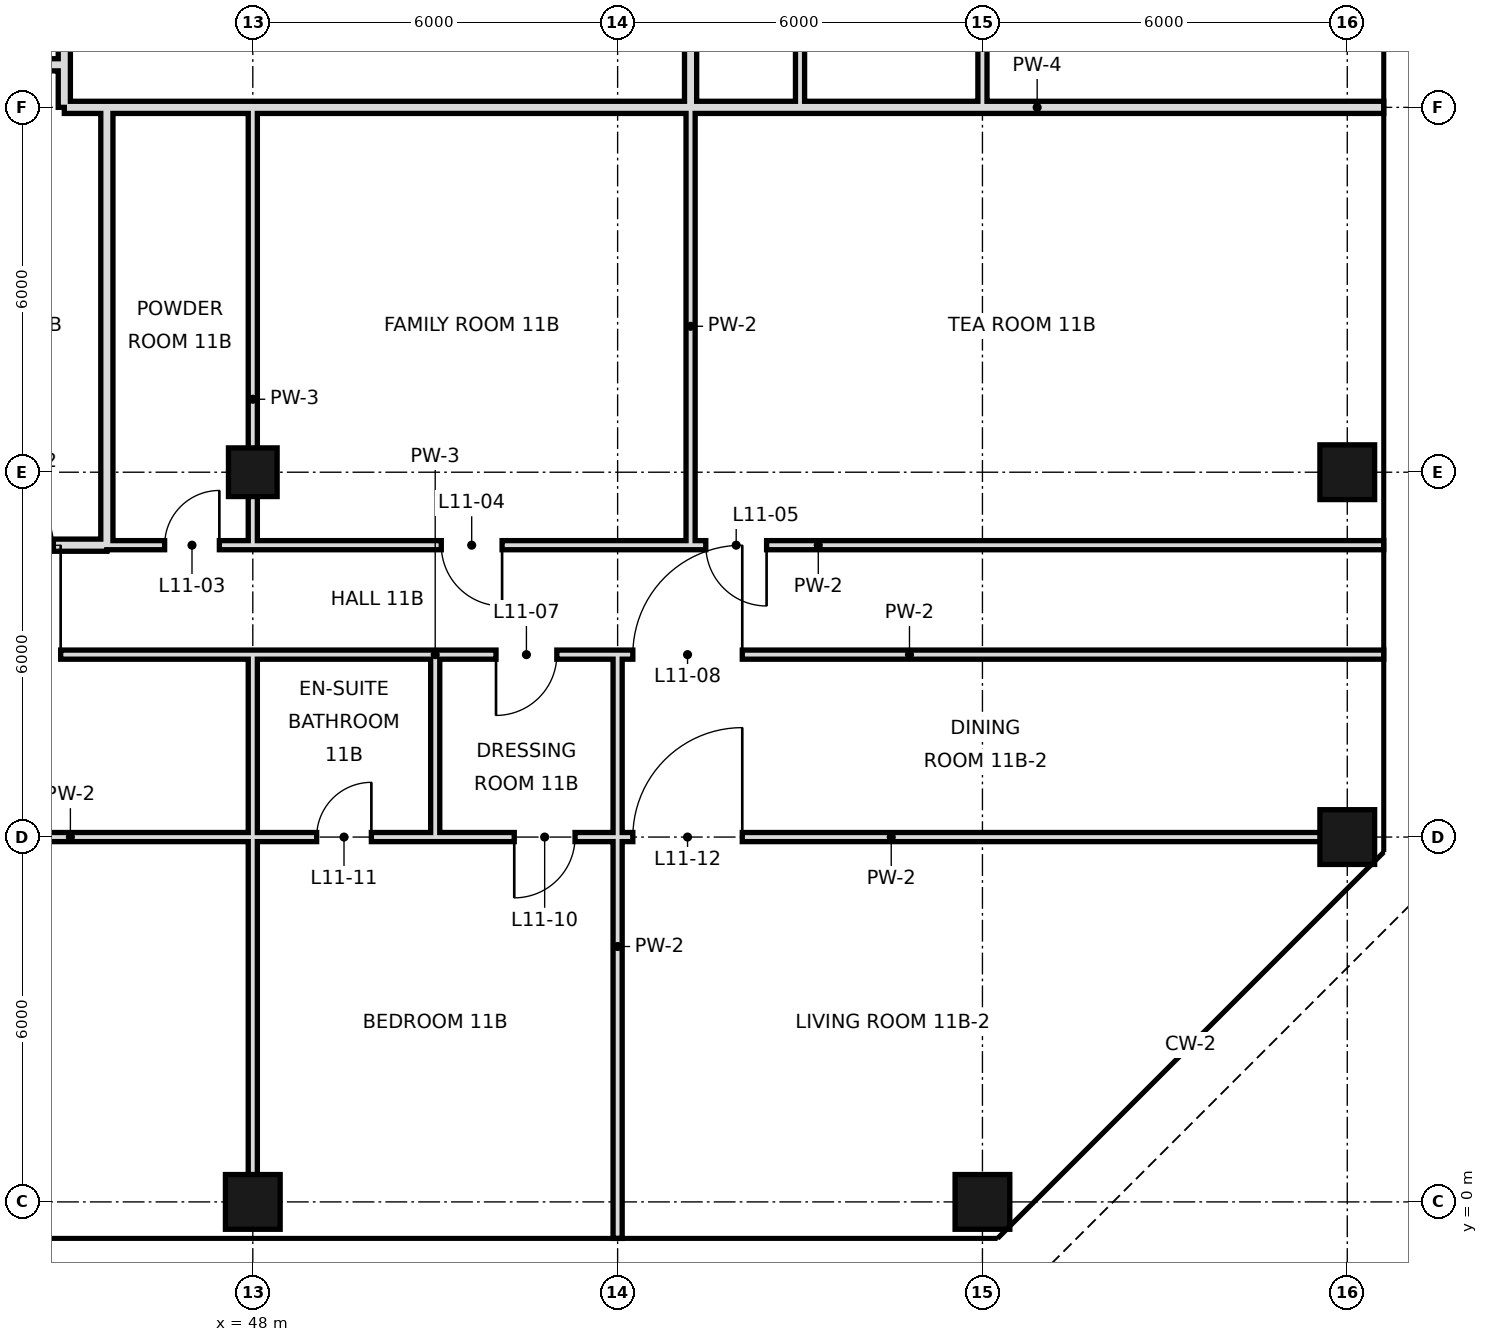
"""IFC4 building model, lengths in metres.
Left out: names, types, materials, properties, quantities, classifications, styles, units other than length and angle.
Written with IfcOpenShell. Run it as: python <this file> out.ifc"""

import sys

from ifc_helpers import new_model, si_unit, direction, frame, frame_2d, origin, origin_2d, place, context, subcontext, project, spatial, rectangle, hollow_rectangle, extrude, element, fill, save


model = new_model("IFC4")
c1 = context("Model", 3, precision=1e-05, world=origin(), true_north=direction((0.0, 1.0)))
c2 = subcontext(c1, "Body", "Model", "MODEL_VIEW")
j1 = project(units=[si_unit("LENGTHUNIT", "METRE"), si_unit("PLANEANGLEUNIT", "RADIAN")], contexts=[c1])
p1 = place(None, origin())
s1 = spatial("IfcSite", under=j1, at=p1, CompositionType="ELEMENT")
p2 = place(p1, origin())
s2 = spatial("IfcBuilding", under=s1, at=p2, CompositionType="ELEMENT")
p3 = place(p2, frame((0.0, 0.0, 60.6)))
s3 = spatial("IfcBuildingStorey", under=s2, at=p3, CompositionType="ELEMENT", Elevation=60.6)
p4 = place(p3, frame((48.0, 0.0, 0.0), z_axis=(0.0, 0.0, 1.0), x_axis=(1.0, 0.0, 0.0)))
e1 = element("IfcColumn", 1, at=p4, inside=s3, PredefinedType="COLUMN", context=c2, shape_type="SweptSolid", body=[
    extrude(hollow_rectangle(XDim=0.9, YDim=0.9, WallThickness=0.045, at=origin_2d()), origin(), (0.0, 0.0, 1.0), 3.6),
])
p5 = place(p3, frame((48.0, 12.0, 0.0), z_axis=(0.0, 0.0, 1.0), x_axis=(1.0, 0.0, 0.0)))
e2 = element("IfcColumn", 2, at=p5, inside=s3, PredefinedType="COLUMN", context=c2, shape_type="SweptSolid", body=[
    extrude(hollow_rectangle(XDim=0.8, YDim=0.8, WallThickness=0.04, at=origin_2d()), origin(), (0.0, 0.0, 1.0), 3.6),
])
for number, where, z_axis, x_axis in (
    (3, (60.0, 0.0, 0.0), (0.0, 0.0, 1.0), (1.0, 0.0, 0.0)),
    (4, (66.0, 6.0, 0.0), (0.0, 0.0, 1.0), (1.0, 0.0, 0.0)),
    (5, (66.0, 12.0, 0.0), (0.0, 0.0, 1.0), (1.0, 0.0, 0.0)),
):
    element("IfcColumn", number, at=place(p3, frame(where, z_axis=z_axis, x_axis=x_axis)), inside=s3, PredefinedType="COLUMN", context=c2, shape_type="SweptSolid", body=[
        extrude(hollow_rectangle(XDim=0.9, YDim=0.9, WallThickness=0.045, at=origin_2d()), origin(), (0.0, 0.0, 1.0), 3.6),
    ])
p6 = place(p3, frame((44.9, 18.0, 0.0), z_axis=(0.0, 0.0, 1.0), x_axis=(0.0, 1.0, 0.0)))
e6 = element("IfcWall", 6, at=p6, inside=s3, PredefinedType="SOLIDWALL", context=c2, shape_type="SweptSolid", body=[
    extrude(rectangle(XDim=4.2, YDim=0.2, at=frame_2d((2.1, 0.0))), origin(), (0.0, 0.0, 1.0), 2.97),
])
p7 = place(p3, frame((45.6, 10.8, 0.0), z_axis=(0.0, 0.0, 1.0), x_axis=(0.0, 1.0, 0.0)))
e7 = element("IfcWall", 7, at=p7, inside=s3, PredefinedType="SOLIDWALL", context=c2, shape_type="SweptSolid", body=[
    extrude(rectangle(XDim=7.2, YDim=0.2, at=frame_2d((3.6, 0.0))), origin(), (0.0, 0.0, 1.0), 2.72),
])
p8 = place(p3, frame((48.0, 0.0, 0.0), z_axis=(0.0, 0.0, 1.0), x_axis=(0.0, 1.0, 0.0)))
e8 = element("IfcWall", 8, at=p8, inside=s3, PredefinedType="PARTITIONING", context=c2, shape_type="SweptSolid", body=[
    extrude(rectangle(XDim=6.0, YDim=0.15, at=frame_2d((3.0, 0.0))), origin(), (0.0, 0.0, 1.0), 2.72),
])
p9 = place(p3, frame((48.0, 6.0, 0.0), z_axis=(0.0, 0.0, 1.0), x_axis=(0.0, 1.0, 0.0)))
e9 = element("IfcWall", 9, at=p9, inside=s3, PredefinedType="PARTITIONING", context=c2, shape_type="SweptSolid", body=[
    extrude(rectangle(XDim=3.0, YDim=0.15, at=frame_2d((1.5, 0.0))), origin(), (0.0, 0.0, 1.0), 2.72),
])
p10 = place(p3, frame((48.0, 10.8, 0.0), z_axis=(0.0, 0.0, 1.0), x_axis=(0.0, 1.0, 0.0)))
e10 = element("IfcWall", 10, at=p10, inside=s3, PredefinedType="PARTITIONING", context=c2, shape_type="SweptSolid", body=[
    extrude(rectangle(XDim=7.2, YDim=0.15, at=frame_2d((3.6, 0.0))), origin(), (0.0, 0.0, 1.0), 2.72),
])
p11 = place(p3, frame((51.0, 6.0, 0.0), z_axis=(0.0, 0.0, 1.0), x_axis=(0.0, 1.0, 0.0)))
e11 = element("IfcWall", 11, at=p11, inside=s3, PredefinedType="PARTITIONING", context=c2, shape_type="SweptSolid", body=[
    extrude(rectangle(XDim=3.0, YDim=0.15, at=frame_2d((1.5, 0.0))), origin(), (0.0, 0.0, 1.0), 3.42),
])
p12 = place(p3, frame((54.0, -0.6, 0.0), z_axis=(0.0, 0.0, 1.0), x_axis=(0.0, 1.0, 0.0)))
e12 = element("IfcWall", 12, at=p12, inside=s3, PredefinedType="PARTITIONING", context=c2, shape_type="SweptSolid", body=[
    extrude(rectangle(XDim=9.6, YDim=0.15, at=frame_2d((4.8, 0.0))), origin(), (0.0, 0.0, 1.0), 3.42),
])
p13 = place(p3, frame((55.2, 18.0, 0.0), z_axis=(0.0, 0.0, 1.0), x_axis=(0.0, 1.0, 0.0)))
e13 = element("IfcWall", 13, at=p13, inside=s3, PredefinedType="SOLIDWALL", context=c2, shape_type="SweptSolid", body=[
    extrude(rectangle(XDim=4.2, YDim=0.2, at=frame_2d((2.1, 0.0))), origin(), (0.0, 0.0, 1.0), 2.52),
])
p14 = place(p13, frame((1.06, 0.0, 0.0)))
e14 = element("IfcOpeningElement", 14, at=p14, cuts=e13, PredefinedType="OPENING", context=c2, shape_type="SweptSolid", body=[
    extrude(rectangle(XDim=1.0, YDim=2.4, at=frame_2d((0.5, 1.2))), frame((0.0, 0.11, 0.0), z_axis=(0.0, -1.0, 0.0), x_axis=(1.0, 0.0, 0.0)), (0.0, 0.0, 1.0), 0.22),
])
p15 = place(p3, frame((55.2, 10.8, 0.0), z_axis=(0.0, 0.0, 1.0), x_axis=(0.0, 1.0, 0.0)))
e15 = element("IfcWall", 15, at=p15, inside=s3, PredefinedType="PARTITIONING", context=c2, shape_type="SweptSolid", body=[
    extrude(rectangle(XDim=7.2, YDim=0.15, at=frame_2d((3.6, 0.0))), origin(), (0.0, 0.0, 1.0), 3.42),
])
p16 = place(p3, frame((57.0, 18.0, 0.0), z_axis=(0.0, 0.0, 1.0), x_axis=(0.0, 1.0, 0.0)))
e16 = element("IfcWall", 16, at=p16, inside=s3, PredefinedType="PARTITIONING", context=c2, shape_type="SweptSolid", body=[
    extrude(rectangle(XDim=14.4, YDim=0.15, at=frame_2d((7.2, 0.0))), origin(), (0.0, 0.0, 1.0), 3.42),
])
p17 = place(p16, frame((7.6, 0.0, 0.0)))
e17 = element("IfcOpeningElement", 17, at=p17, cuts=e16, PredefinedType="OPENING", context=c2, shape_type="SweptSolid", body=[
    extrude(rectangle(XDim=1.0, YDim=2.4, at=frame_2d((0.5, 1.2))), frame((0.0, 0.085, 0.0), z_axis=(0.0, -1.0, 0.0), x_axis=(1.0, 0.0, 0.0)), (0.0, 0.0, 1.0), 0.17),
])
p18 = place(p16, frame((12.52, 0.0, 0.0)))
e18 = element("IfcOpeningElement", 18, at=p18, cuts=e16, PredefinedType="OPENING", context=c2, shape_type="SweptSolid", body=[
    extrude(rectangle(XDim=1.0, YDim=2.4, at=frame_2d((0.5, 1.2))), frame((0.0, 0.085, 0.0), z_axis=(0.0, -1.0, 0.0), x_axis=(1.0, 0.0, 0.0)), (0.0, 0.0, 1.0), 0.17),
])
p19 = place(p3, frame((60.0, 18.0, 0.0), z_axis=(0.0, 0.0, 1.0), x_axis=(0.0, 1.0, 0.0)))
e19 = element("IfcWall", 19, at=p19, inside=s3, PredefinedType="PARTITIONING", context=c2, shape_type="SweptSolid", body=[
    extrude(rectangle(XDim=14.4, YDim=0.15, at=frame_2d((7.2, 0.0))), origin(), (0.0, 0.0, 1.0), 3.42),
])
p20 = place(p19, frame((5.5, 0.0, 0.0)))
e20 = element("IfcOpeningElement", 20, at=p20, cuts=e19, PredefinedType="OPENING", context=c2, shape_type="SweptSolid", body=[
    extrude(rectangle(XDim=1.0, YDim=2.4, at=frame_2d((0.5, 1.2))), frame((0.0, 0.085, 0.0), z_axis=(0.0, -1.0, 0.0), x_axis=(1.0, 0.0, 0.0)), (0.0, 0.0, 1.0), 0.17),
])
p21 = place(p19, frame((12.52, 0.0, 0.0)))
e21 = element("IfcOpeningElement", 21, at=p21, cuts=e19, PredefinedType="OPENING", context=c2, shape_type="SweptSolid", body=[
    extrude(rectangle(XDim=1.0, YDim=2.4, at=frame_2d((0.5, 1.2))), frame((0.0, 0.085, 0.0), z_axis=(0.0, -1.0, 0.0), x_axis=(1.0, 0.0, 0.0)), (0.0, 0.0, 1.0), 0.17),
])
p22 = place(p3, frame((42.0, 10.8, 0.0), z_axis=(0.0, 0.0, 1.0), x_axis=(1.0, 0.0, 0.0)))
e22 = element("IfcWall", 22, at=p22, inside=s3, PredefinedType="SOLIDWALL", context=c2, shape_type="SweptSolid", body=[
    extrude(rectangle(XDim=3.6, YDim=0.2, at=frame_2d((1.8, 0.0))), origin(), (0.0, 0.0, 1.0), 2.72),
])
p23 = place(p22, frame((1.72, 0.0, 0.0)))
e23 = element("IfcOpeningElement", 23, at=p23, cuts=e22, PredefinedType="OPENING", context=c2, shape_type="SweptSolid", body=[
    extrude(rectangle(XDim=1.0, YDim=2.4, at=frame_2d((0.5, 1.2))), frame((0.0, 0.11, 0.0), z_axis=(0.0, -1.0, 0.0), x_axis=(1.0, 0.0, 0.0)), (0.0, 0.0, 1.0), 0.22),
])
p24 = place(p3, frame((48.0, 10.8, 0.0), z_axis=(0.0, 0.0, 1.0), x_axis=(1.0, 0.0, 0.0)))
e24 = element("IfcWall", 24, at=p24, inside=s3, PredefinedType="PARTITIONING", context=c2, shape_type="SweptSolid", body=[
    extrude(rectangle(XDim=18.6, YDim=0.15, at=frame_2d((9.3, 0.0))), origin(), (0.0, 0.0, 1.0), 3.42),
])
p25 = place(p24, frame((3.1, 0.0, 0.0)))
e25 = element("IfcOpeningElement", 25, at=p25, cuts=e24, PredefinedType="OPENING", context=c2, shape_type="SweptSolid", body=[
    extrude(rectangle(XDim=1.0, YDim=2.4, at=frame_2d((0.5, 1.2))), frame((0.0, 0.085, 0.0), z_axis=(0.0, -1.0, 0.0), x_axis=(1.0, 0.0, 0.0)), (0.0, 0.0, 1.0), 0.17),
])
p26 = place(p24, frame((7.45, 0.0, 0.0)))
e26 = element("IfcOpeningElement", 26, at=p26, cuts=e24, PredefinedType="OPENING", context=c2, shape_type="SweptSolid", body=[
    extrude(rectangle(XDim=1.0, YDim=2.4, at=frame_2d((0.5, 1.2))), frame((0.0, 0.085, 0.0), z_axis=(0.0, -1.0, 0.0), x_axis=(1.0, 0.0, 0.0)), (0.0, 0.0, 1.0), 0.17),
])
p27 = place(p3, frame((45.6, 10.8, 0.0), z_axis=(0.0, 0.0, 1.0), x_axis=(1.0, 0.0, 0.0)))
e27 = element("IfcWall", 27, at=p27, inside=s3, PredefinedType="PARTITIONING", context=c2, shape_type="SweptSolid", body=[
    extrude(rectangle(XDim=2.4, YDim=0.15, at=frame_2d((1.2, 0.0))), origin(), (0.0, 0.0, 1.0), 3.42),
])
p28 = place(p27, frame((0.95, 0.0, 0.0)))
e28 = element("IfcOpeningElement", 28, at=p28, cuts=e27, PredefinedType="OPENING", context=c2, shape_type="SweptSolid", body=[
    extrude(rectangle(XDim=0.9, YDim=2.4, at=frame_2d((0.45, 1.2))), frame((0.0, 0.085, 0.0), z_axis=(0.0, -1.0, 0.0), x_axis=(1.0, 0.0, 0.0)), (0.0, 0.0, 1.0), 0.17),
])
p29 = place(p3, frame((44.9, 18.0, 0.0), z_axis=(0.0, 0.0, 1.0), x_axis=(1.0, 0.0, 0.0)))
e29 = element("IfcWall", 29, at=p29, inside=s3, PredefinedType="SOLIDWALL", context=c2, shape_type="SweptSolid", body=[
    extrude(rectangle(XDim=10.3, YDim=0.2, at=frame_2d((5.15, 0.0))), origin(), (0.0, 0.0, 1.0), 2.52),
])
p30 = place(p3, frame((55.2, 18.0, 0.0), z_axis=(0.0, 0.0, 1.0), x_axis=(1.0, 0.0, 0.0)))
e30 = element("IfcWall", 30, at=p30, inside=s3, PredefinedType="SOLIDWALL", context=c2, shape_type="SweptSolid", body=[
    extrude(rectangle(XDim=11.4, YDim=0.2, at=frame_2d((5.7, 0.0))), origin(), (0.0, 0.0, 1.0), 2.52),
])
p31 = place(p3, frame((42.0, 18.7, 0.0), z_axis=(0.0, 0.0, 1.0), x_axis=(1.0, 0.0, 0.0)))
e31 = element("IfcWall", 31, at=p31, inside=s3, PredefinedType="SOLIDWALL", context=c2, shape_type="SweptSolid", body=[
    extrude(rectangle(XDim=2.9, YDim=0.2, at=frame_2d((1.45, 0.0))), origin(), (0.0, 0.0, 1.0), 2.72),
])
p32 = place(p3, frame((36.0, 6.0, 0.0), z_axis=(0.0, 0.0, 1.0), x_axis=(1.0, 0.0, 0.0)))
e32 = element("IfcWall", 32, at=p32, inside=s3, PredefinedType="PARTITIONING", context=c2, shape_type="SweptSolid", body=[
    extrude(rectangle(XDim=12.0, YDim=0.15, at=frame_2d((6.0, 0.0))), origin(), (0.0, 0.0, 1.0), 2.97),
])
p33 = place(p32, frame((3.16, 0.0, 0.0)))
e33 = element("IfcOpeningElement", 33, at=p33, cuts=e32, PredefinedType="OPENING", context=c2, shape_type="SweptSolid", body=[
    extrude(rectangle(XDim=1.8, YDim=2.4, at=frame_2d((0.9, 1.2))), frame((0.0, 0.085, 0.0), z_axis=(0.0, -1.0, 0.0), x_axis=(1.0, 0.0, 0.0)), (0.0, 0.0, 1.0), 0.17),
])
p34 = place(p3, frame((51.0, 6.0, 0.0), z_axis=(0.0, 0.0, 1.0), x_axis=(1.0, 0.0, 0.0)))
e34 = element("IfcWall", 34, at=p34, inside=s3, PredefinedType="PARTITIONING", context=c2, shape_type="SweptSolid", body=[
    extrude(rectangle(XDim=15.0, YDim=0.15, at=frame_2d((7.5, 0.0))), origin(), (0.0, 0.0, 1.0), 2.52),
])
p35 = place(p34, frame((1.3, 0.0, 0.0)))
e35 = element("IfcOpeningElement", 35, at=p35, cuts=e34, PredefinedType="OPENING", context=c2, shape_type="SweptSolid", body=[
    extrude(rectangle(XDim=1.0, YDim=2.4, at=frame_2d((0.5, 1.2))), frame((0.0, 0.085, 0.0), z_axis=(0.0, -1.0, 0.0), x_axis=(1.0, 0.0, 0.0)), (0.0, 0.0, 1.0), 0.17),
])
p36 = place(p34, frame((3.25, 0.0, 0.0)))
e36 = element("IfcOpeningElement", 36, at=p36, cuts=e34, PredefinedType="OPENING", context=c2, shape_type="SweptSolid", body=[
    extrude(rectangle(XDim=1.8, YDim=2.4, at=frame_2d((0.9, 1.2))), frame((0.0, 0.085, 0.0), z_axis=(0.0, -1.0, 0.0), x_axis=(1.0, 0.0, 0.0)), (0.0, 0.0, 1.0), 0.17),
])
p37 = place(p3, frame((48.0, 6.0, 0.0), z_axis=(0.0, 0.0, 1.0), x_axis=(1.0, 0.0, 0.0)))
e37 = element("IfcWall", 37, at=p37, inside=s3, PredefinedType="PARTITIONING", context=c2, shape_type="SweptSolid", body=[
    extrude(rectangle(XDim=3.0, YDim=0.15, at=frame_2d((1.5, 0.0))), origin(), (0.0, 0.0, 1.0), 2.52),
])
p38 = place(p37, frame((1.05, 0.0, 0.0)))
e38 = element("IfcOpeningElement", 38, at=p38, cuts=e37, PredefinedType="OPENING", context=c2, shape_type="SweptSolid", body=[
    extrude(rectangle(XDim=0.9, YDim=2.4, at=frame_2d((0.45, 1.2))), frame((0.0, 0.085, 0.0), z_axis=(0.0, -1.0, 0.0), x_axis=(1.0, 0.0, 0.0)), (0.0, 0.0, 1.0), 0.17),
])
p39 = place(p3, frame((36.0, 9.0, 0.0), z_axis=(0.0, 0.0, 1.0), x_axis=(1.0, 0.0, 0.0)))
e39 = element("IfcWall", 39, at=p39, inside=s3, PredefinedType="PARTITIONING", context=c2, shape_type="SweptSolid", body=[
    extrude(rectangle(XDim=12.0, YDim=0.15, at=frame_2d((6.0, 0.0))), origin(), (0.0, 0.0, 1.0), 3.42),
])
p40 = place(p39, frame((7.04, 0.0, 0.0)))
e40 = element("IfcOpeningElement", 40, at=p40, cuts=e39, PredefinedType="OPENING", context=c2, shape_type="SweptSolid", body=[
    extrude(rectangle(XDim=1.8, YDim=2.4, at=frame_2d((0.9, 1.2))), frame((0.0, 0.085, 0.0), z_axis=(0.0, -1.0, 0.0), x_axis=(1.0, 0.0, 0.0)), (0.0, 0.0, 1.0), 0.17),
])
p41 = place(p3, frame((51.0, 9.0, 0.0), z_axis=(0.0, 0.0, 1.0), x_axis=(1.0, 0.0, 0.0)))
e41 = element("IfcWall", 41, at=p41, inside=s3, PredefinedType="PARTITIONING", context=c2, shape_type="SweptSolid", body=[
    extrude(rectangle(XDim=15.6, YDim=0.15, at=frame_2d((7.8, 0.0))), origin(), (0.0, 0.0, 1.0), 3.42),
])
p42 = place(p41, frame((1.0, 0.0, 0.0)))
e42 = element("IfcOpeningElement", 42, at=p42, cuts=e41, PredefinedType="OPENING", context=c2, shape_type="SweptSolid", body=[
    extrude(rectangle(XDim=1.0, YDim=2.4, at=frame_2d((0.5, 1.2))), frame((0.0, 0.085, 0.0), z_axis=(0.0, -1.0, 0.0), x_axis=(1.0, 0.0, 0.0)), (0.0, 0.0, 1.0), 0.17),
])
p43 = place(p41, frame((3.25, 0.0, 0.0)))
e43 = element("IfcOpeningElement", 43, at=p43, cuts=e41, PredefinedType="OPENING", context=c2, shape_type="SweptSolid", body=[
    extrude(rectangle(XDim=1.8, YDim=2.4, at=frame_2d((0.9, 1.2))), frame((0.0, 0.085, 0.0), z_axis=(0.0, -1.0, 0.0), x_axis=(1.0, 0.0, 0.0)), (0.0, 0.0, 1.0), 0.17),
])
p44 = place(p3, frame((48.0, 9.0, 0.0), z_axis=(0.0, 0.0, 1.0), x_axis=(1.0, 0.0, 0.0)))
e44 = element("IfcWall", 44, at=p44, inside=s3, PredefinedType="PARTITIONING", context=c2, shape_type="SweptSolid", body=[
    extrude(rectangle(XDim=3.0, YDim=0.15, at=frame_2d((1.5, 0.0))), origin(), (0.0, 0.0, 1.0), 3.42),
])
p45 = place(p23, origin())
e45 = element("IfcDoor", 45, at=p45, inside=s3, OperationType="SINGLE_SWING_LEFT", PredefinedType="DOOR", context=c2, shape_type="SweptSolid", body=[
    extrude(rectangle(XDim=1.0, YDim=2.4, at=frame_2d((0.5, 1.2))), frame((0.0, 0.025, 0.0), z_axis=(0.0, -1.0, 0.0), x_axis=(1.0, 0.0, 0.0)), (0.0, 0.0, 1.0), 0.05),
])
fill(e23, e45)
p46 = place(p28, frame((0.9, 0.0, 0.0), z_axis=(0.0, 0.0, 1.0), x_axis=(-1.0, 0.0, 0.0)))
e46 = element("IfcDoor", 46, at=p46, inside=s3, OperationType="SINGLE_SWING_LEFT", PredefinedType="DOOR", context=c2, shape_type="SweptSolid", body=[
    extrude(rectangle(XDim=0.9, YDim=2.4, at=frame_2d((0.45, 1.2))), frame((0.0, 0.025, 0.0), z_axis=(0.0, -1.0, 0.0), x_axis=(1.0, 0.0, 0.0)), (0.0, 0.0, 1.0), 0.05),
])
fill(e28, e46)
p47 = place(p25, origin())
e47 = element("IfcDoor", 47, at=p47, inside=s3, OperationType="SINGLE_SWING_RIGHT", PredefinedType="DOOR", context=c2, shape_type="SweptSolid", body=[
    extrude(rectangle(XDim=1.0, YDim=2.4, at=frame_2d((0.5, 1.2))), frame((0.0, 0.025, 0.0), z_axis=(0.0, -1.0, 0.0), x_axis=(1.0, 0.0, 0.0)), (0.0, 0.0, 1.0), 0.05),
])
fill(e25, e47)
p48 = place(p26, origin())
e48 = element("IfcDoor", 48, at=p48, inside=s3, OperationType="SINGLE_SWING_RIGHT", PredefinedType="DOOR", context=c2, shape_type="SweptSolid", body=[
    extrude(rectangle(XDim=1.0, YDim=2.4, at=frame_2d((0.5, 1.2))), frame((0.0, 0.025, 0.0), z_axis=(0.0, -1.0, 0.0), x_axis=(1.0, 0.0, 0.0)), (0.0, 0.0, 1.0), 0.05),
])
fill(e26, e48)
p49 = place(p40, frame((1.8, 0.0, 0.0), z_axis=(0.0, 0.0, 1.0), x_axis=(-1.0, 0.0, 0.0)))
e49 = element("IfcDoor", 49, at=p49, inside=s3, OperationType="SINGLE_SWING_LEFT", PredefinedType="DOOR", context=c2, shape_type="SweptSolid", body=[
    extrude(rectangle(XDim=1.8, YDim=2.4, at=frame_2d((0.9, 1.2))), frame((0.0, 0.025, 0.0), z_axis=(0.0, -1.0, 0.0), x_axis=(1.0, 0.0, 0.0)), (0.0, 0.0, 1.0), 0.05),
])
fill(e40, e49)
p50 = place(p42, frame((1.0, 0.0, 0.0), z_axis=(0.0, 0.0, 1.0), x_axis=(-1.0, 0.0, 0.0)))
e50 = element("IfcDoor", 50, at=p50, inside=s3, OperationType="SINGLE_SWING_RIGHT", PredefinedType="DOOR", context=c2, shape_type="SweptSolid", body=[
    extrude(rectangle(XDim=1.0, YDim=2.4, at=frame_2d((0.5, 1.2))), frame((0.0, 0.025, 0.0), z_axis=(0.0, -1.0, 0.0), x_axis=(1.0, 0.0, 0.0)), (0.0, 0.0, 1.0), 0.05),
])
fill(e42, e50)
p51 = place(p43, frame((1.8, 0.0, 0.0), z_axis=(0.0, 0.0, 1.0), x_axis=(-1.0, 0.0, 0.0)))
e51 = element("IfcDoor", 51, at=p51, inside=s3, OperationType="SINGLE_SWING_LEFT", PredefinedType="DOOR", context=c2, shape_type="SweptSolid", body=[
    extrude(rectangle(XDim=1.8, YDim=2.4, at=frame_2d((0.9, 1.2))), frame((0.0, 0.025, 0.0), z_axis=(0.0, -1.0, 0.0), x_axis=(1.0, 0.0, 0.0)), (0.0, 0.0, 1.0), 0.05),
])
fill(e43, e51)
p52 = place(p35, frame((1.0, 0.0, 0.0), z_axis=(0.0, 0.0, 1.0), x_axis=(-1.0, 0.0, 0.0)))
e52 = element("IfcDoor", 52, at=p52, inside=s3, OperationType="SINGLE_SWING_RIGHT", PredefinedType="DOOR", context=c2, shape_type="SweptSolid", body=[
    extrude(rectangle(XDim=1.0, YDim=2.4, at=frame_2d((0.5, 1.2))), frame((0.0, 0.025, 0.0), z_axis=(0.0, -1.0, 0.0), x_axis=(1.0, 0.0, 0.0)), (0.0, 0.0, 1.0), 0.05),
])
fill(e35, e52)
p53 = place(p38, frame((0.9, 0.0, 0.0), z_axis=(0.0, 0.0, 1.0), x_axis=(-1.0, 0.0, 0.0)))
e53 = element("IfcDoor", 53, at=p53, inside=s3, OperationType="SINGLE_SWING_LEFT", PredefinedType="DOOR", context=c2, shape_type="SweptSolid", body=[
    extrude(rectangle(XDim=0.9, YDim=2.4, at=frame_2d((0.45, 1.2))), frame((0.0, 0.025, 0.0), z_axis=(0.0, -1.0, 0.0), x_axis=(1.0, 0.0, 0.0)), (0.0, 0.0, 1.0), 0.05),
])
fill(e38, e53)
p54 = place(p36, frame((1.8, 0.0, 0.0), z_axis=(0.0, 0.0, 1.0), x_axis=(-1.0, 0.0, 0.0)))
e54 = element("IfcDoor", 54, at=p54, inside=s3, OperationType="SINGLE_SWING_LEFT", PredefinedType="DOOR", context=c2, shape_type="SweptSolid", body=[
    extrude(rectangle(XDim=1.8, YDim=2.4, at=frame_2d((0.9, 1.2))), frame((0.0, 0.025, 0.0), z_axis=(0.0, -1.0, 0.0), x_axis=(1.0, 0.0, 0.0)), (0.0, 0.0, 1.0), 0.05),
])
fill(e36, e54)
save(model, sys.argv[1])
